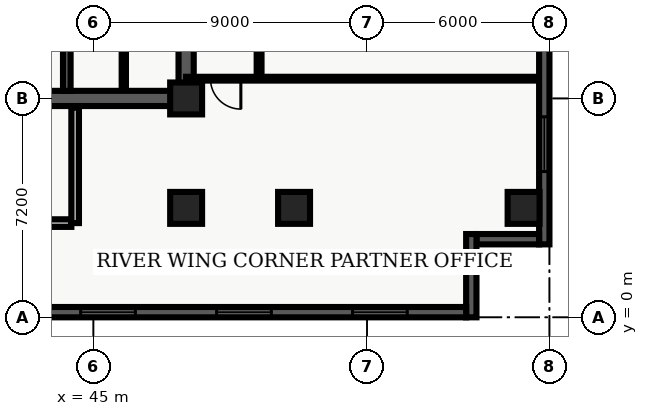
"""IFC4 building model, lengths in metres.
Left out: names, types, materials, properties, quantities, classifications, styles, units other than length and angle.
Written with IfcOpenShell. Run it as: python <this file> out.ifc"""

import sys

from ifc_helpers import new_model, entity, si_unit, converted_unit, direction, frame, origin_with_axes, origin_2d_with_axis, place, context, subcontext, project, spatial, polyline, rectangle, outline, extrude, element, fill, save


model = new_model("IFC4")
c1 = context("Model", 3, precision=1e-05, world=origin_with_axes(), true_north=direction((0.0, 1.0)))
c2 = subcontext(c1, "Body", "Model", "MODEL_VIEW")
j1 = project(units=[si_unit("LENGTHUNIT", "METRE"), converted_unit("PLANEANGLEUNIT", "DEGREE", entity("IfcPlaneAngleMeasure", 0.017), si_unit("PLANEANGLEUNIT", "RADIAN"), dimensions=[0, 0, 0, 0, 0, 0, 0])], contexts=[c1])
p1 = place(None, origin_with_axes())
s1 = spatial("IfcSite", under=j1, at=p1, CompositionType="ELEMENT")
p2 = place(p1, origin_with_axes())
s2 = spatial("IfcBuilding", under=s1, at=p2, CompositionType="ELEMENT")
p3 = place(p2, frame((0.0, 0.0, 175.8), z_axis=(0.0, 0.0, 1.0), x_axis=(1.0, 0.0, 0.0)))
s3 = spatial("IfcBuildingStorey", under=s2, at=p3, CompositionType="ELEMENT", Elevation=175.8)
p4 = place(p3, frame((40.2, 7.2, 0.0), z_axis=(0.0, 0.0, 1.0), x_axis=(1.0, 0.0, 0.0)))
e1 = element("IfcWall", 1, at=p4, inside=s3, PredefinedType="SHEAR", context=c2, shape_type="SweptSolid", body=[
    extrude(outline(polyline([(0.0, -0.25), (7.85, -0.25), (7.85, 0.25), (0.0, 0.25), (0.0, -0.25)])), origin_with_axes(), (0.0, 0.0, 1.0), 3.66),
])
p5 = place(p4, frame((2.175, 0.0, 0.0), z_axis=(0.0, 0.0, 1.0), x_axis=(1.0, 0.0, 0.0)))
e2 = element("IfcOpeningElement", 2, at=p5, cuts=e1, PredefinedType="OPENING", context=c2, shape_type="SweptSolid", body=[
    extrude(rectangle(XDim=1.05, YDim=0.52, at=origin_2d_with_axis()), origin_with_axes(), (0.0, 0.0, 1.0), 2.15),
])
p6 = place(p3, frame((48.05, 7.2, 0.0), z_axis=(0.0, 0.0, 1.0), x_axis=(0.0, 1.0, 0.0)))
e3 = element("IfcWall", 3, at=p6, inside=s3, PredefinedType="SHEAR", context=c2, shape_type="SweptSolid", body=[
    extrude(outline(polyline([(0.0, -0.25), (15.6, -0.25), (15.6, 0.25), (0.0, 0.25), (0.0, -0.25)])), origin_with_axes(), (0.0, 0.0, 1.0), 3.66),
])
p7 = place(p6, frame((5.975, 0.0, 0.0), z_axis=(0.0, 0.0, 1.0), x_axis=(1.0, 0.0, 0.0)))
e4 = element("IfcOpeningElement", 4, at=p7, cuts=e3, PredefinedType="OPENING", context=c2, shape_type="SweptSolid", body=[
    extrude(rectangle(XDim=1.05, YDim=0.52, at=origin_2d_with_axis()), origin_with_axes(), (0.0, 0.0, 1.0), 2.15),
])
p8 = place(p6, frame((2.725, 0.0, 0.0), z_axis=(0.0, 0.0, 1.0), x_axis=(1.0, 0.0, 0.0)))
e5 = element("IfcOpeningElement", 5, at=p8, cuts=e3, PredefinedType="OPENING", context=c2, shape_type="SweptSolid", body=[
    extrude(rectangle(XDim=0.95, YDim=0.52, at=origin_2d_with_axis()), origin_with_axes(), (0.0, 0.0, 1.0), 2.15),
])
p9 = place(p3, frame((44.125, 7.45, 0.0), z_axis=(0.0, 0.0, 1.0), x_axis=(0.0, 1.0, 0.0)))
e6 = element("IfcWall", 6, at=p9, inside=s3, PredefinedType="SHEAR", context=c2, shape_type="SweptSolid", body=[
    extrude(outline(polyline([(0.0, -0.125), (15.1, -0.125), (15.1, 0.125), (0.0, 0.125), (0.0, -0.125)])), origin_with_axes(), (0.0, 0.0, 1.0), 3.66),
])
p10 = place(p3, frame((40.325, 3.1, 0.0), z_axis=(0.0, 0.0, 1.0), x_axis=(1.0, 0.0, 0.0)))
e7 = element("IfcWall", 7, at=p10, inside=s3, PredefinedType="SOLIDWALL", context=c2, shape_type="SweptSolid", body=[
    extrude(outline(polyline([(0.0, -0.125), (3.95, -0.125), (3.95, 0.125), (0.0, 0.125), (0.0, -0.125)])), origin_with_axes(), (0.0, 0.0, 1.0), 2.7),
])
p11 = place(p3, frame((44.4, 3.1, 0.0), z_axis=(0.0, 0.0, 1.0), x_axis=(0.0, 1.0, 0.0)))
e8 = element("IfcWall", 8, at=p11, inside=s3, PredefinedType="SOLIDWALL", context=c2, shape_type="SweptSolid", body=[
    extrude(outline(polyline([(0.0, -0.125), (3.8, -0.125), (3.8, 0.125), (0.0, 0.125), (0.0, -0.125)])), origin_with_axes(), (0.0, 0.0, 1.0), 2.7),
])
for number, where, z_axis, x_axis in (
    (9, (48.05, 3.6, 0.0), (0.0, 0.0, 1.0), (1.0, 0.0, 0.0)),
    (10, (48.05, 7.2, 0.0), (0.0, 0.0, 1.0), (1.0, 0.0, 0.0)),
    (11, (51.6, 3.6, 0.0), (0.0, 0.0, 1.0), (1.0, 0.0, 0.0)),
    (12, (59.15, 3.6, 0.0), (0.0, 0.0, 1.0), (1.0, 0.0, 0.0)),
):
    element("IfcColumn", number, at=place(p3, frame(where, z_axis=z_axis, x_axis=x_axis)), inside=s3, PredefinedType="COLUMN", context=c2, shape_type="SweptSolid", body=[
        extrude(rectangle(XDim=1.05, YDim=1.05, at=origin_2d_with_axis()), origin_with_axes(), (0.0, 0.0, 1.0), 3.9),
    ])
p12 = place(p3, frame((46.0, 7.5, 0.0), z_axis=(0.0, 0.0, 1.0), x_axis=(0.0, 1.0, 0.0)))
e13 = element("IfcWall", 13, at=p12, inside=s3, PredefinedType="PARTITIONING", context=c2, shape_type="SweptSolid", body=[
    extrude(outline(polyline([(0.0, -0.07), (4.08, -0.07), (4.08, 0.07), (0.0, 0.07), (0.0, -0.07)])), origin_with_axes(), (0.0, 0.0, 1.0), 2.7),
])
p13 = place(p12, frame((2.0, 0.0, 0.0), z_axis=(0.0, 0.0, 1.0), x_axis=(1.0, 0.0, 0.0)))
e14 = element("IfcOpeningElement", 14, at=p13, cuts=e13, PredefinedType="OPENING", context=c2, shape_type="SweptSolid", body=[
    extrude(rectangle(XDim=0.9, YDim=0.16, at=origin_2d_with_axis()), origin_with_axes(), (0.0, 0.0, 1.0), 2.15),
])
p14 = place(p3, frame((50.45, 7.85, 0.0), z_axis=(0.0, 0.0, 1.0), x_axis=(0.0, 1.0, 0.0)))
e15 = element("IfcWall", 15, at=p14, inside=s3, PredefinedType="PARTITIONING", context=c2, shape_type="SweptSolid", body=[
    extrude(outline(polyline([(0.0, -0.08), (18.8, -0.08), (18.8, 0.08), (0.0, 0.08), (0.0, -0.08)])), origin_with_axes(), (0.0, 0.0, 1.0), 2.7),
])
p15 = place(p14, frame((5.823, 0.0, 0.0), z_axis=(0.0, 0.0, 1.0), x_axis=(1.0, 0.0, 0.0)))
e16 = element("IfcOpeningElement", 16, at=p15, cuts=e15, PredefinedType="OPENING", context=c2, shape_type="SweptSolid", body=[
    extrude(rectangle(XDim=1.0, YDim=0.18, at=origin_2d_with_axis()), origin_with_axes(), (0.0, 0.0, 1.0), 2.15),
])
p16 = place(p14, frame((11.602, 0.0, 0.0), z_axis=(0.0, 0.0, 1.0), x_axis=(1.0, 0.0, 0.0)))
e17 = element("IfcOpeningElement", 17, at=p16, cuts=e15, PredefinedType="OPENING", context=c2, shape_type="SweptSolid", body=[
    extrude(rectangle(XDim=1.0, YDim=0.18, at=origin_2d_with_axis()), origin_with_axes(), (0.0, 0.0, 1.0), 2.15),
])
p17 = place(p14, frame((14.129, 0.0, 0.0), z_axis=(0.0, 0.0, 1.0), x_axis=(1.0, 0.0, 0.0)))
e18 = element("IfcOpeningElement", 18, at=p17, cuts=e15, PredefinedType="OPENING", context=c2, shape_type="SweptSolid", body=[
    extrude(rectangle(XDim=1.0, YDim=0.18, at=origin_2d_with_axis()), origin_with_axes(), (0.0, 0.0, 1.0), 2.15),
])
p18 = place(p3, frame((59.665, 7.85, 0.0), z_axis=(0.0, 0.0, 1.0), x_axis=(-1.0, 0.0, 0.0)))
e19 = element("IfcWall", 19, at=p18, inside=s3, PredefinedType="PARTITIONING", context=c2, shape_type="SweptSolid", body=[
    extrude(outline(polyline([(0.0, -0.062), (11.615, -0.062), (11.615, 0.062), (0.0, 0.062), (0.0, -0.062)])), origin_with_axes(), (0.0, 0.0, 1.0), 2.7),
])
p19 = place(p18, frame((10.315, 0.0, 0.0), z_axis=(0.0, 0.0, 1.0), x_axis=(1.0, 0.0, 0.0)))
e20 = element("IfcOpeningElement", 20, at=p19, cuts=e19, PredefinedType="OPENING", context=c2, shape_type="SweptSolid", body=[
    extrude(rectangle(XDim=1.0, YDim=0.145, at=origin_2d_with_axis()), origin_with_axes(), (0.0, 0.0, 1.0), 2.15),
])
p20 = place(p3, frame((59.83, 26.06, 0.0), z_axis=(0.0, 0.0, 1.0), x_axis=(0.0, -1.0, 0.0)))
e21 = element("IfcWall", 21, at=p20, inside=s3, PredefinedType="SOLIDWALL", context=c2, shape_type="SweptSolid", body=[
    extrude(outline(polyline([(0.0, -0.17), (23.66, -0.17), (23.66, 0.17), (0.0, 0.17), (0.0, -0.17)])), origin_with_axes(), (0.0, 0.0, 1.0), 3.66),
])
p21 = place(p20, frame((3.696, 0.0, 0.45), z_axis=(0.0, 0.0, 1.0), x_axis=(1.0, 0.0, 0.0)))
e22 = element("IfcOpeningElement", 22, at=p21, cuts=e21, PredefinedType="OPENING", context=c2, shape_type="SweptSolid", body=[
    extrude(rectangle(XDim=1.8, YDim=0.36, at=origin_2d_with_axis()), origin_with_axes(), (0.0, 0.0, 1.0), 2.1),
])
p22 = place(p20, frame((11.83, 0.0, 0.45), z_axis=(0.0, 0.0, 1.0), x_axis=(1.0, 0.0, 0.0)))
e23 = element("IfcOpeningElement", 23, at=p22, cuts=e21, PredefinedType="OPENING", context=c2, shape_type="SweptSolid", body=[
    extrude(rectangle(XDim=1.8, YDim=0.36, at=origin_2d_with_axis()), origin_with_axes(), (0.0, 0.0, 1.0), 2.1),
])
p23 = place(p20, frame((20.364, 0.0, 0.45), z_axis=(0.0, 0.0, 1.0), x_axis=(1.0, 0.0, 0.0)))
e24 = element("IfcOpeningElement", 24, at=p23, cuts=e21, PredefinedType="OPENING", context=c2, shape_type="SweptSolid", body=[
    extrude(rectangle(XDim=1.8, YDim=0.36, at=origin_2d_with_axis()), origin_with_axes(), (0.0, 0.0, 1.0), 2.1),
])
p24 = place(p3, frame((59.66, 2.57, 0.0), z_axis=(0.0, 0.0, 1.0), x_axis=(-1.0, 0.0, 0.0)))
e25 = element("IfcWall", 25, at=p24, inside=s3, PredefinedType="SOLIDWALL", context=c2, shape_type="SweptSolid", body=[
    extrude(outline(polyline([(0.0, -0.17), (2.06, -0.17), (2.06, 0.17), (0.0, 0.17), (0.0, -0.17)])), origin_with_axes(), (0.0, 0.0, 1.0), 3.66),
])
p25 = place(p3, frame((57.43, 2.74, 0.0), z_axis=(0.0, 0.0, 1.0), x_axis=(0.0, -1.0, 0.0)))
e26 = element("IfcWall", 26, at=p25, inside=s3, PredefinedType="SOLIDWALL", context=c2, shape_type="SweptSolid", body=[
    extrude(outline(polyline([(0.0, -0.17), (2.74, -0.17), (2.74, 0.17), (0.0, 0.17), (0.0, -0.17)])), origin_with_axes(), (0.0, 0.0, 1.0), 3.66),
])
p26 = place(p3, frame((57.26, 0.17, 0.0), z_axis=(0.0, 0.0, 1.0), x_axis=(-1.0, 0.0, 0.0)))
e27 = element("IfcWall", 27, at=p26, inside=s3, PredefinedType="SOLIDWALL", context=c2, shape_type="SweptSolid", body=[
    extrude(outline(polyline([(0.0, -0.17), (54.86, -0.17), (54.86, 0.17), (0.0, 0.17), (0.0, -0.17)])), origin_with_axes(), (0.0, 0.0, 1.0), 3.66),
])
p27 = place(p26, frame((2.836, 0.0, 0.45), z_axis=(0.0, 0.0, 1.0), x_axis=(1.0, 0.0, 0.0)))
e28 = element("IfcOpeningElement", 28, at=p27, cuts=e27, PredefinedType="OPENING", context=c2, shape_type="SweptSolid", body=[
    extrude(rectangle(XDim=1.8, YDim=0.36, at=origin_2d_with_axis()), origin_with_axes(), (0.0, 0.0, 1.0), 2.1),
])
p28 = place(p26, frame((7.307, 0.0, 0.45), z_axis=(0.0, 0.0, 1.0), x_axis=(1.0, 0.0, 0.0)))
e29 = element("IfcOpeningElement", 29, at=p28, cuts=e27, PredefinedType="OPENING", context=c2, shape_type="SweptSolid", body=[
    extrude(rectangle(XDim=1.8, YDim=0.36, at=origin_2d_with_axis()), origin_with_axes(), (0.0, 0.0, 1.0), 2.1),
])
p29 = place(p26, frame((11.779, 0.0, 0.45), z_axis=(0.0, 0.0, 1.0), x_axis=(1.0, 0.0, 0.0)))
e30 = element("IfcOpeningElement", 30, at=p29, cuts=e27, PredefinedType="OPENING", context=c2, shape_type="SweptSolid", body=[
    extrude(rectangle(XDim=1.8, YDim=0.36, at=origin_2d_with_axis()), origin_with_axes(), (0.0, 0.0, 1.0), 2.1),
])
p30 = place(p26, frame((16.251, 0.0, 0.45), z_axis=(0.0, 0.0, 1.0), x_axis=(1.0, 0.0, 0.0)))
e31 = element("IfcOpeningElement", 31, at=p30, cuts=e27, PredefinedType="OPENING", context=c2, shape_type="SweptSolid", body=[
    extrude(rectangle(XDim=1.8, YDim=0.36, at=origin_2d_with_axis()), origin_with_axes(), (0.0, 0.0, 1.0), 2.1),
])
p31 = place(p26, frame((20.723, 0.0, 0.45), z_axis=(0.0, 0.0, 1.0), x_axis=(1.0, 0.0, 0.0)))
e32 = element("IfcOpeningElement", 32, at=p31, cuts=e27, PredefinedType="OPENING", context=c2, shape_type="SweptSolid", body=[
    extrude(rectangle(XDim=1.8, YDim=0.36, at=origin_2d_with_axis()), origin_with_axes(), (0.0, 0.0, 1.0), 2.1),
])
p32 = place(p26, frame((25.194, 0.0, 0.45), z_axis=(0.0, 0.0, 1.0), x_axis=(1.0, 0.0, 0.0)))
e33 = element("IfcOpeningElement", 33, at=p32, cuts=e27, PredefinedType="OPENING", context=c2, shape_type="SweptSolid", body=[
    extrude(rectangle(XDim=1.8, YDim=0.36, at=origin_2d_with_axis()), origin_with_axes(), (0.0, 0.0, 1.0), 2.1),
])
p33 = place(p26, frame((29.666, 0.0, 0.45), z_axis=(0.0, 0.0, 1.0), x_axis=(1.0, 0.0, 0.0)))
e34 = element("IfcOpeningElement", 34, at=p33, cuts=e27, PredefinedType="OPENING", context=c2, shape_type="SweptSolid", body=[
    extrude(rectangle(XDim=1.8, YDim=0.36, at=origin_2d_with_axis()), origin_with_axes(), (0.0, 0.0, 1.0), 2.1),
])
p34 = place(p26, frame((34.138, 0.0, 0.45), z_axis=(0.0, 0.0, 1.0), x_axis=(1.0, 0.0, 0.0)))
e35 = element("IfcOpeningElement", 35, at=p34, cuts=e27, PredefinedType="OPENING", context=c2, shape_type="SweptSolid", body=[
    extrude(rectangle(XDim=1.8, YDim=0.36, at=origin_2d_with_axis()), origin_with_axes(), (0.0, 0.0, 1.0), 2.1),
])
p35 = place(p26, frame((38.609, 0.0, 0.45), z_axis=(0.0, 0.0, 1.0), x_axis=(1.0, 0.0, 0.0)))
e36 = element("IfcOpeningElement", 36, at=p35, cuts=e27, PredefinedType="OPENING", context=c2, shape_type="SweptSolid", body=[
    extrude(rectangle(XDim=1.8, YDim=0.36, at=origin_2d_with_axis()), origin_with_axes(), (0.0, 0.0, 1.0), 2.1),
])
p36 = place(p26, frame((43.081, 0.0, 0.45), z_axis=(0.0, 0.0, 1.0), x_axis=(1.0, 0.0, 0.0)))
e37 = element("IfcOpeningElement", 37, at=p36, cuts=e27, PredefinedType="OPENING", context=c2, shape_type="SweptSolid", body=[
    extrude(rectangle(XDim=1.8, YDim=0.36, at=origin_2d_with_axis()), origin_with_axes(), (0.0, 0.0, 1.0), 2.1),
])
p37 = place(p26, frame((47.553, 0.0, 0.45), z_axis=(0.0, 0.0, 1.0), x_axis=(1.0, 0.0, 0.0)))
e38 = element("IfcOpeningElement", 38, at=p37, cuts=e27, PredefinedType="OPENING", context=c2, shape_type="SweptSolid", body=[
    extrude(rectangle(XDim=1.8, YDim=0.36, at=origin_2d_with_axis()), origin_with_axes(), (0.0, 0.0, 1.0), 2.1),
])
p38 = place(p26, frame((52.024, 0.0, 0.45), z_axis=(0.0, 0.0, 1.0), x_axis=(1.0, 0.0, 0.0)))
e39 = element("IfcOpeningElement", 39, at=p38, cuts=e27, PredefinedType="OPENING", context=c2, shape_type="SweptSolid", body=[
    extrude(rectangle(XDim=1.8, YDim=0.36, at=origin_2d_with_axis()), origin_with_axes(), (0.0, 0.0, 1.0), 2.1),
])
p39 = place(p18, frame((10.315, 0.0, 0.0), z_axis=(0.0, 0.0, 1.0), x_axis=(1.0, 0.0, 0.0)))
e40 = element("IfcDoor", 40, at=p39, inside=s3, OperationType="SINGLE_SWING_LEFT", PredefinedType="DOOR", context=c2, shape_type="SweptSolid", body=[
    extrude(rectangle(XDim=1.0, YDim=0.075, at=origin_2d_with_axis()), origin_with_axes(), (0.0, 0.0, 1.0), 2.15),
])
fill(e20, e40)
p40 = place(p20, frame((20.364, 0.0, 0.45), z_axis=(0.0, 0.0, 1.0), x_axis=(1.0, 0.0, 0.0)))
e41 = element("IfcWindow", 41, at=p40, inside=s3, PredefinedType="WINDOW", context=c2, shape_type="SweptSolid", body=[
    extrude(rectangle(XDim=1.8, YDim=0.09, at=origin_2d_with_axis()), origin_with_axes(), (0.0, 0.0, 1.0), 2.1),
])
fill(e24, e41)
p41 = place(p26, frame((2.836, 0.0, 0.45), z_axis=(0.0, 0.0, 1.0), x_axis=(1.0, 0.0, 0.0)))
e42 = element("IfcWindow", 42, at=p41, inside=s3, PredefinedType="WINDOW", context=c2, shape_type="SweptSolid", body=[
    extrude(rectangle(XDim=1.8, YDim=0.09, at=origin_2d_with_axis()), origin_with_axes(), (0.0, 0.0, 1.0), 2.1),
])
fill(e28, e42)
p42 = place(p26, frame((7.307, 0.0, 0.45), z_axis=(0.0, 0.0, 1.0), x_axis=(1.0, 0.0, 0.0)))
e43 = element("IfcWindow", 43, at=p42, inside=s3, PredefinedType="WINDOW", context=c2, shape_type="SweptSolid", body=[
    extrude(rectangle(XDim=1.8, YDim=0.09, at=origin_2d_with_axis()), origin_with_axes(), (0.0, 0.0, 1.0), 2.1),
])
fill(e29, e43)
p43 = place(p26, frame((11.779, 0.0, 0.45), z_axis=(0.0, 0.0, 1.0), x_axis=(1.0, 0.0, 0.0)))
e44 = element("IfcWindow", 44, at=p43, inside=s3, PredefinedType="WINDOW", context=c2, shape_type="SweptSolid", body=[
    extrude(rectangle(XDim=1.8, YDim=0.09, at=origin_2d_with_axis()), origin_with_axes(), (0.0, 0.0, 1.0), 2.1),
])
fill(e30, e44)
save(model, sys.argv[1])
